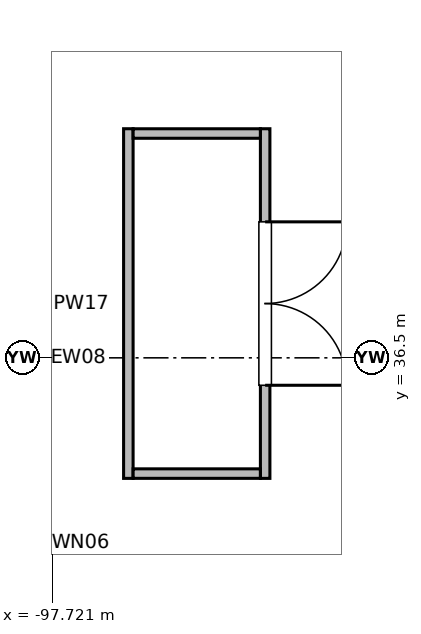
"""IFC4 building model, lengths in metres.
Left out: names, types, materials, properties, quantities, classifications, styles, units other than length and angle.
Written with IfcOpenShell. Run it as: python <this file> out.ifc"""

import sys

from ifc_helpers import new_model, si_unit, direction, frame, frame_2d, origin, place, context, subcontext, project, spatial, rectangle, extrude, element, fill, save


model = new_model("IFC4")
c1 = context("Model", 3, precision=1e-05, world=origin(), true_north=direction((0.0, 1.0)))
c2 = subcontext(c1, "Body", "Model", "MODEL_VIEW")
j1 = project(units=[si_unit("LENGTHUNIT", "METRE"), si_unit("PLANEANGLEUNIT", "RADIAN")], contexts=[c1])
p1 = place(None, origin())
s1 = spatial("IfcSite", under=j1, at=p1, CompositionType="ELEMENT")
p2 = place(p1, origin())
s2 = spatial("IfcBuilding", under=s1, at=p2, CompositionType="ELEMENT")
p3 = place(p2, frame((0.0, 0.0, -6.0)))
s3 = spatial("IfcBuildingStorey", under=s2, at=p3, CompositionType="ELEMENT", Elevation=-6.0)
p4 = place(p3, frame((-94.917, 39.514, 0.0), z_axis=(0.0, 0.0, 1.0), x_axis=(0.0, -1.0, 0.0)))
e1 = element("IfcWall", 1, at=p4, inside=s3, PredefinedType="PARTITIONING", context=c2, shape_type="SweptSolid", body=[
    extrude(rectangle(XDim=4.6, YDim=0.125, at=frame_2d((2.3, 0.0))), origin(), (0.0, 0.0, 1.0), 5.02),
])
p5 = place(p4, frame((1.225, 0.0, 0.0)))
e2 = element("IfcOpeningElement", 2, at=p5, cuts=e1, PredefinedType="OPENING", context=c2, shape_type="SweptSolid", body=[
    extrude(rectangle(XDim=2.15, YDim=2.45, at=frame_2d((1.075, 1.225))), frame((0.0, 0.073, 0.0), z_axis=(0.0, -1.0, 0.0), x_axis=(1.0, 0.0, 0.0)), (0.0, 0.0, 1.0), 0.145),
])
p6 = place(p3, frame((-96.717, 34.914, 0.0), z_axis=(0.0, 0.0, 1.0), x_axis=(0.0, 1.0, 0.0)))
e3 = element("IfcWall", 3, at=p6, inside=s3, PredefinedType="PARTITIONING", context=c2, shape_type="SweptSolid", body=[
    extrude(rectangle(XDim=4.6, YDim=0.125, at=frame_2d((2.3, 0.0))), origin(), (0.0, 0.0, 1.0), 5.02),
])
for number, where, z_axis, x_axis in (
    (4, (-96.654, 34.977, 0.0), (0.0, 0.0, 1.0), (1.0, 0.0, 0.0)),
    (5, (-96.654, 39.451, 0.0), (0.0, 0.0, 1.0), (1.0, 0.0, 0.0)),
):
    element("IfcWall", number, at=place(p3, frame(where, z_axis=z_axis, x_axis=x_axis)), inside=s3, PredefinedType="PARTITIONING", context=c2, shape_type="SweptSolid", body=[
        extrude(rectangle(XDim=1.674, YDim=0.125, at=frame_2d((0.837, 0.0))), origin(), (0.0, 0.0, 1.0), 5.02),
    ])
p7 = place(p5, origin())
e6 = element("IfcDoor", 6, at=p7, inside=s3, OperationType="DOUBLE_DOOR_SINGLE_SWING", PredefinedType="DOOR", context=c2, shape_type="SweptSolid", body=[
    extrude(rectangle(XDim=2.15, YDim=2.45, at=frame_2d((1.075, 1.225))), frame((0.0, 0.025, 0.0), z_axis=(0.0, -1.0, 0.0), x_axis=(1.0, 0.0, 0.0)), (0.0, 0.0, 1.0), 0.05),
])
fill(e2, e6)
save(model, sys.argv[1])
